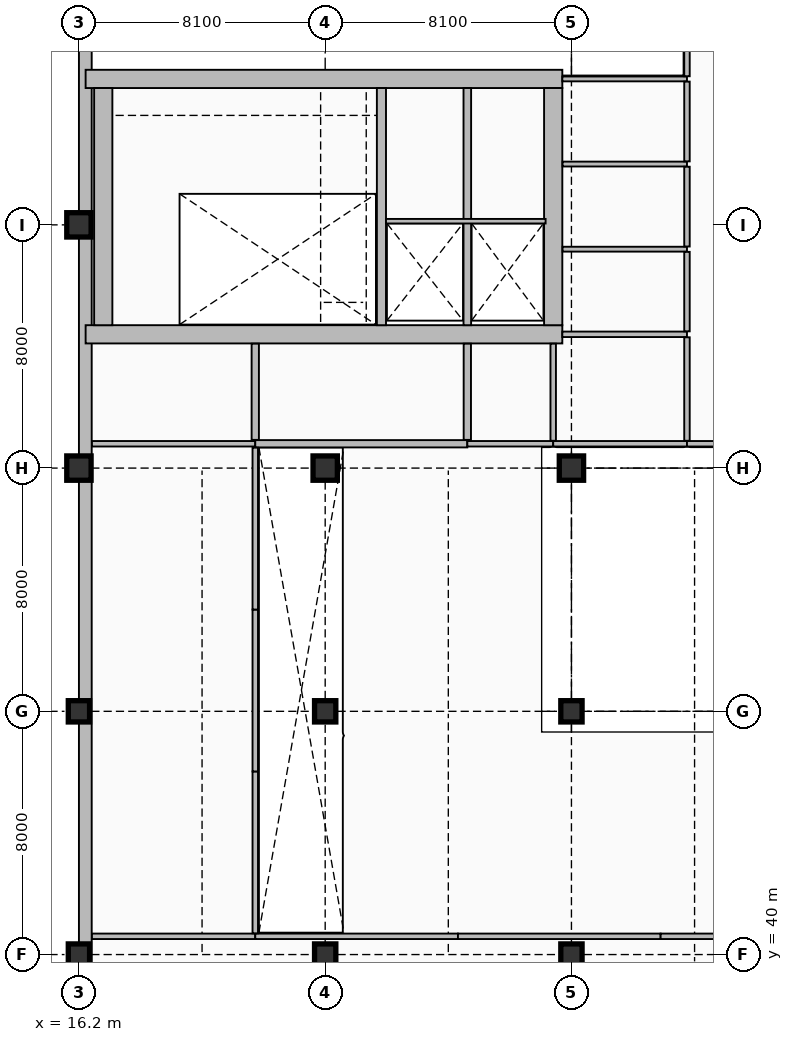
"""IFC4 building model, lengths in metres.
Left out: names, types, materials, properties, quantities, classifications, styles, units other than length and angle.
Written with IfcOpenShell. Run it as: python <this file> out.ifc"""

import sys

from ifc_helpers import new_model, si_unit, direction, frame, frame_2d, origin, origin_2d, place, context, subcontext, project, spatial, rectangle, extrude, element, fill, save


model = new_model("IFC4")
c1 = context("Model", 3, precision=1e-05, world=origin(), true_north=direction((0.0, 1.0)))
c2 = subcontext(c1, "Body", "Model", "MODEL_VIEW")
j1 = project(units=[si_unit("LENGTHUNIT", "METRE"), si_unit("PLANEANGLEUNIT", "RADIAN")], contexts=[c1])
p1 = place(None, origin())
s1 = spatial("IfcSite", under=j1, at=p1, CompositionType="ELEMENT")
p2 = place(p1, origin())
s2 = spatial("IfcBuilding", under=s1, at=p2, CompositionType="ELEMENT")
p3 = place(p2, frame((0.0, 0.0, -4.8)))
s3 = spatial("IfcBuildingStorey", under=s2, at=p3, CompositionType="ELEMENT", Elevation=-4.8)
p4 = place(p3, frame((16.41, 24.21, 0.0), z_axis=(0.0, 0.0, 1.0), x_axis=(0.0, 1.0, 0.0)))
e1 = element("IfcWall", 1, at=p4, inside=s3, PredefinedType="USERDEFINED", context=c2, shape_type="SweptSolid", body=[
    extrude(rectangle(XDim=87.58, YDim=0.42, at=frame_2d((43.79, 0.0))), origin(), (0.0, 0.0, 1.0), 4.45),
])
p5 = place(p3, frame((16.42, 60.4, 0.0), z_axis=(0.0, 0.0, 1.0), x_axis=(1.0, 0.0, 0.0)))
e2 = element("IfcWall", 2, at=p5, inside=s3, PredefinedType="SHEAR", context=c2, shape_type="SweptSolid", body=[
    extrude(rectangle(XDim=15.68, YDim=0.6, at=frame_2d((7.84, 0.0))), origin(), (0.0, 0.0, 1.0), 4.8),
])
p6 = place(p5, frame((1.33, 0.0, 0.0)))
e3 = element("IfcOpeningElement", 3, at=p6, cuts=e2, PredefinedType="OPENING", context=c2, shape_type="SweptSolid", body=[
    extrude(rectangle(XDim=1.15, YDim=2.25, at=frame_2d((0.575, 1.125))), frame((0.0, 0.31, 0.0), z_axis=(0.0, -1.0, 0.0), x_axis=(1.0, 0.0, 0.0)), (0.0, 0.0, 1.0), 0.62),
])
p7 = place(p5, frame((10.613, 0.0, 0.0)))
e4 = element("IfcOpeningElement", 4, at=p7, cuts=e2, PredefinedType="OPENING", context=c2, shape_type="SweptSolid", body=[
    extrude(rectangle(XDim=1.1, YDim=2.2, at=frame_2d((0.55, 1.1))), frame((0.0, 0.31, 0.0), z_axis=(0.0, -1.0, 0.0), x_axis=(1.0, 0.0, 0.0)), (0.0, 0.0, 1.0), 0.62),
])
p8 = place(p5, frame((13.327, 0.0, 0.0)))
e5 = element("IfcOpeningElement", 5, at=p8, cuts=e2, PredefinedType="OPENING", context=c2, shape_type="SweptSolid", body=[
    extrude(rectangle(XDim=1.1, YDim=2.2, at=frame_2d((0.55, 1.1))), frame((0.0, 0.31, 0.0), z_axis=(0.0, -1.0, 0.0), x_axis=(1.0, 0.0, 0.0)), (0.0, 0.0, 1.0), 0.62),
])
p9 = place(p3, frame((16.42, 68.8, 0.0), z_axis=(0.0, 0.0, 1.0), x_axis=(1.0, 0.0, 0.0)))
e6 = element("IfcWall", 6, at=p9, inside=s3, PredefinedType="SHEAR", context=c2, shape_type="SweptSolid", body=[
    extrude(rectangle(XDim=15.68, YDim=0.6, at=frame_2d((7.84, 0.0))), origin(), (0.0, 0.0, 1.0), 4.8),
])
for number, where, z_axis, x_axis in (
    (7, (17.0, 60.7, 0.0), (0.0, 0.0, 1.0), (0.0, 1.0, 0.0)),
    (8, (31.8, 60.7, 0.0), (0.0, 0.0, 1.0), (0.0, 1.0, 0.0)),
):
    element("IfcWall", number, at=place(p3, frame(where, z_axis=z_axis, x_axis=x_axis)), inside=s3, PredefinedType="SHEAR", context=c2, shape_type="SweptSolid", body=[
        extrude(rectangle(XDim=7.8, YDim=0.6, at=frame_2d((3.9, 0.0))), origin(), (0.0, 0.0, 1.0), 4.8),
    ])
p10 = place(p3, frame((26.15, 60.7, 0.0), z_axis=(0.0, 0.0, 1.0), x_axis=(0.0, 1.0, 0.0)))
e9 = element("IfcWall", 9, at=p10, inside=s3, PredefinedType="SHEAR", context=c2, shape_type="SweptSolid", body=[
    extrude(rectangle(XDim=7.8, YDim=0.3, at=frame_2d((3.9, 0.0))), origin(), (0.0, 0.0, 1.0), 4.8),
])
p11 = place(p3, frame((28.975, 60.7, 0.0), z_axis=(0.0, 0.0, 1.0), x_axis=(0.0, 1.0, 0.0)))
e10 = element("IfcWall", 10, at=p11, inside=s3, PredefinedType="SHEAR", context=c2, shape_type="SweptSolid", body=[
    extrude(rectangle(XDim=7.8, YDim=0.25, at=frame_2d((3.9, 0.0))), origin(), (0.0, 0.0, 1.0), 4.8),
])
for number, where, z_axis, x_axis in (
    (11, (16.2, 40.0, 0.0), (0.0, 0.0, 1.0), (1.0, 0.0, 0.0)),
    (12, (16.2, 48.0, 0.0), (0.0, 0.0, 1.0), (1.0, 0.0, 0.0)),
):
    element("IfcColumn", number, at=place(p3, frame(where, z_axis=z_axis, x_axis=x_axis)), inside=s3, PredefinedType="COLUMN", context=c2, shape_type="SweptSolid", body=[
        extrude(rectangle(XDim=0.7, YDim=0.7, at=origin_2d()), origin(), (0.0, 0.0, 1.0), 4.8),
    ])
for number, where, z_axis, x_axis in (
    (13, (16.2, 56.0, 0.0), (0.0, 0.0, 1.0), (1.0, 0.0, 0.0)),
    (14, (16.2, 64.0, 0.0), (0.0, 0.0, 1.0), (1.0, 0.0, 0.0)),
):
    element("IfcColumn", number, at=place(p3, frame(where, z_axis=z_axis, x_axis=x_axis)), inside=s3, PredefinedType="COLUMN", context=c2, shape_type="SweptSolid", body=[
        extrude(rectangle(XDim=0.8, YDim=0.8, at=origin_2d()), origin(), (0.0, 0.0, 1.0), 4.8),
    ])
for number, where, z_axis, x_axis in (
    (15, (24.3, 40.0, 0.0), (0.0, 0.0, 1.0), (1.0, 0.0, 0.0)),
    (16, (24.3, 48.0, 0.0), (0.0, 0.0, 1.0), (1.0, 0.0, 0.0)),
):
    element("IfcColumn", number, at=place(p3, frame(where, z_axis=z_axis, x_axis=x_axis)), inside=s3, PredefinedType="COLUMN", context=c2, shape_type="SweptSolid", body=[
        extrude(rectangle(XDim=0.7, YDim=0.7, at=origin_2d()), origin(), (0.0, 0.0, 1.0), 4.8),
    ])
p12 = place(p3, frame((24.3, 56.0, 0.0), z_axis=(0.0, 0.0, 1.0), x_axis=(1.0, 0.0, 0.0)))
e17 = element("IfcColumn", 17, at=p12, inside=s3, PredefinedType="COLUMN", context=c2, shape_type="SweptSolid", body=[
    extrude(rectangle(XDim=0.8, YDim=0.8, at=origin_2d()), origin(), (0.0, 0.0, 1.0), 4.8),
])
for number, where, z_axis, x_axis in (
    (18, (32.4, 40.0, 0.0), (0.0, 0.0, 1.0), (1.0, 0.0, 0.0)),
    (19, (32.4, 48.0, 0.0), (0.0, 0.0, 1.0), (1.0, 0.0, 0.0)),
):
    element("IfcColumn", number, at=place(p3, frame(where, z_axis=z_axis, x_axis=x_axis)), inside=s3, PredefinedType="COLUMN", context=c2, shape_type="SweptSolid", body=[
        extrude(rectangle(XDim=0.7, YDim=0.7, at=origin_2d()), origin(), (0.0, 0.0, 1.0), 4.8),
    ])
p13 = place(p3, frame((32.4, 56.0, 0.0), z_axis=(0.0, 0.0, 1.0), x_axis=(1.0, 0.0, 0.0)))
e20 = element("IfcColumn", 20, at=p13, inside=s3, PredefinedType="COLUMN", context=c2, shape_type="SweptSolid", body=[
    extrude(rectangle(XDim=0.8, YDim=0.8, at=origin_2d()), origin(), (0.0, 0.0, 1.0), 4.8),
])
p14 = place(p3, frame((26.3, 64.12, 0.0), z_axis=(0.0, 0.0, 1.0), x_axis=(1.0, 0.0, 0.0)))
e21 = element("IfcWall", 21, at=p14, inside=s3, PredefinedType="PARTITIONING", context=c2, shape_type="SweptSolid", body=[
    extrude(rectangle(XDim=5.25, YDim=0.15, at=frame_2d((2.625, 0.0))), origin(), (0.0, 0.0, 1.0), 4.45),
])
p15 = place(p3, frame((16.628, 40.6, 0.0), z_axis=(0.0, 0.0, 1.0), x_axis=(1.0, 0.0, 0.0)))
e22 = element("IfcWall", 22, at=p15, inside=s3, PredefinedType="PARTITIONING", context=c2, shape_type="SweptSolid", body=[
    extrude(rectangle(XDim=5.372, YDim=0.18, at=frame_2d((2.686, 0.0))), origin(), (0.0, 0.0, 1.0), 4.45),
])
p16 = place(p15, frame((2.136, 0.0, 0.0)))
e23 = element("IfcOpeningElement", 23, at=p16, cuts=e22, PredefinedType="OPENING", context=c2, shape_type="SweptSolid", body=[
    extrude(rectangle(XDim=1.1, YDim=2.2, at=frame_2d((0.55, 1.1))), frame((0.0, 0.1, 0.0), z_axis=(0.0, -1.0, 0.0), x_axis=(1.0, 0.0, 0.0)), (0.0, 0.0, 1.0), 0.2),
])
p17 = place(p3, frame((16.628, 56.8, 0.0), z_axis=(0.0, 0.0, 1.0), x_axis=(1.0, 0.0, 0.0)))
e24 = element("IfcWall", 24, at=p17, inside=s3, PredefinedType="PARTITIONING", context=c2, shape_type="SweptSolid", body=[
    extrude(rectangle(XDim=5.372, YDim=0.18, at=frame_2d((2.686, 0.0))), origin(), (0.0, 0.0, 1.0), 4.45),
])
p18 = place(p17, frame((2.136, 0.0, 0.0)))
e25 = element("IfcOpeningElement", 25, at=p18, cuts=e24, PredefinedType="OPENING", context=c2, shape_type="SweptSolid", body=[
    extrude(rectangle(XDim=1.1, YDim=2.2, at=frame_2d((0.55, 1.1))), frame((0.0, 0.1, 0.0), z_axis=(0.0, -1.0, 0.0), x_axis=(1.0, 0.0, 0.0)), (0.0, 0.0, 1.0), 0.2),
])
p19 = place(p3, frame((22.0, 40.6, 0.0), z_axis=(0.0, 0.0, 1.0), x_axis=(1.0, 0.0, 0.0)))
e26 = element("IfcWall", 26, at=p19, inside=s3, PredefinedType="PARTITIONING", context=c2, shape_type="SweptSolid", body=[
    extrude(rectangle(XDim=6.667, YDim=0.18, at=frame_2d((3.333, 0.0))), origin(), (0.0, 0.0, 1.0), 4.45),
])
p20 = place(p3, frame((28.667, 40.6, 0.0), z_axis=(0.0, 0.0, 1.0), x_axis=(1.0, 0.0, 0.0)))
e27 = element("IfcWall", 27, at=p20, inside=s3, PredefinedType="PARTITIONING", context=c2, shape_type="SweptSolid", body=[
    extrude(rectangle(XDim=6.667, YDim=0.18, at=frame_2d((3.333, 0.0))), origin(), (0.0, 0.0, 1.0), 4.45),
])
p21 = place(p3, frame((35.333, 40.6, 0.0), z_axis=(0.0, 0.0, 1.0), x_axis=(1.0, 0.0, 0.0)))
e28 = element("IfcWall", 28, at=p21, inside=s3, PredefinedType="PARTITIONING", context=c2, shape_type="SweptSolid", body=[
    extrude(rectangle(XDim=6.667, YDim=0.18, at=frame_2d((3.333, 0.0))), origin(), (0.0, 0.0, 1.0), 4.45),
])
p22 = place(p3, frame((22.0, 56.8, 0.0), z_axis=(0.0, 0.0, 1.0), x_axis=(1.0, 0.0, 0.0)))
e29 = element("IfcWall", 29, at=p22, inside=s3, PredefinedType="PARTITIONING", context=c2, shape_type="SweptSolid", body=[
    extrude(rectangle(XDim=6.975, YDim=0.24, at=frame_2d((3.488, 0.0))), origin(), (0.0, 0.0, 1.0), 4.45),
])
p23 = place(p22, frame((4.003, 0.0, 0.0)))
e30 = element("IfcOpeningElement", 30, at=p23, cuts=e29, PredefinedType="OPENING", context=c2, shape_type="SweptSolid", body=[
    extrude(rectangle(XDim=1.2, YDim=2.3, at=frame_2d((0.6, 1.15))), frame((0.0, 0.13, 0.0), z_axis=(0.0, -1.0, 0.0), x_axis=(1.0, 0.0, 0.0)), (0.0, 0.0, 1.0), 0.26),
])
p24 = place(p3, frame((28.975, 56.8, 0.0), z_axis=(0.0, 0.0, 1.0), x_axis=(1.0, 0.0, 0.0)))
e31 = element("IfcWall", 31, at=p24, inside=s3, PredefinedType="PARTITIONING", context=c2, shape_type="SweptSolid", body=[
    extrude(rectangle(XDim=2.825, YDim=0.18, at=frame_2d((1.413, 0.0))), origin(), (0.0, 0.0, 1.0), 4.45),
])
p25 = place(p24, frame((0.636, 0.0, 0.0)))
e32 = element("IfcOpeningElement", 32, at=p25, cuts=e31, PredefinedType="OPENING", context=c2, shape_type="SweptSolid", body=[
    extrude(rectangle(XDim=1.1, YDim=2.2, at=frame_2d((0.55, 1.1))), frame((0.0, 0.1, 0.0), z_axis=(0.0, -1.0, 0.0), x_axis=(1.0, 0.0, 0.0)), (0.0, 0.0, 1.0), 0.2),
])
p26 = place(p3, frame((31.8, 56.8, 0.0), z_axis=(0.0, 0.0, 1.0), x_axis=(1.0, 0.0, 0.0)))
e33 = element("IfcWall", 33, at=p26, inside=s3, PredefinedType="PARTITIONING", context=c2, shape_type="SweptSolid", body=[
    extrude(rectangle(XDim=4.4, YDim=0.18, at=frame_2d((2.2, 0.0))), origin(), (0.0, 0.0, 1.0), 4.45),
])
p27 = place(p3, frame((32.1, 60.4, 0.0), z_axis=(0.0, 0.0, 1.0), x_axis=(1.0, 0.0, 0.0)))
e34 = element("IfcWall", 34, at=p27, inside=s3, PredefinedType="PARTITIONING", context=c2, shape_type="SweptSolid", body=[
    extrude(rectangle(XDim=4.1, YDim=0.18, at=frame_2d((2.05, 0.0))), origin(), (0.0, 0.0, 1.0), 4.45),
])
for number, where, z_axis, x_axis in (
    (35, (32.108, 63.2, 0.0), (0.0, 0.0, 1.0), (1.0, 0.0, 0.0)),
    (36, (32.108, 66.0, 0.0), (0.0, 0.0, 1.0), (1.0, 0.0, 0.0)),
):
    element("IfcWall", number, at=place(p3, frame(where, z_axis=z_axis, x_axis=x_axis)), inside=s3, PredefinedType="PARTITIONING", context=c2, shape_type="SweptSolid", body=[
        extrude(rectangle(XDim=4.092, YDim=0.16, at=frame_2d((2.046, 0.0))), origin(), (0.0, 0.0, 1.0), 4.45),
    ])
p28 = place(p3, frame((32.1, 68.8, 0.0), z_axis=(0.0, 0.0, 1.0), x_axis=(1.0, 0.0, 0.0)))
e37 = element("IfcWall", 37, at=p28, inside=s3, PredefinedType="PARTITIONING", context=c2, shape_type="SweptSolid", body=[
    extrude(rectangle(XDim=4.1, YDim=0.16, at=frame_2d((2.05, 0.0))), origin(), (0.0, 0.0, 1.0), 4.45),
])
p29 = place(p3, frame((36.2, 56.8, 0.0), z_axis=(0.0, 0.0, 1.0), x_axis=(1.0, 0.0, 0.0)))
e38 = element("IfcWall", 38, at=p29, inside=s3, PredefinedType="PARTITIONING", context=c2, shape_type="SweptSolid", body=[
    extrude(rectangle(XDim=4.3, YDim=0.18, at=frame_2d((2.15, 0.0))), origin(), (0.0, 0.0, 1.0), 4.45),
])
for number, where, z_axis, x_axis in (
    (39, (22.0, 40.698, 0.0), (0.0, 0.0, 1.0), (0.0, 1.0, 0.0)),
    (40, (22.0, 46.023, 0.0), (0.0, 0.0, 1.0), (0.0, 1.0, 0.0)),
    (41, (22.0, 51.347, 0.0), (0.0, 0.0, 1.0), (0.0, 1.0, 0.0)),
):
    element("IfcWall", number, at=place(p3, frame(where, z_axis=z_axis, x_axis=x_axis)), inside=s3, PredefinedType="PARTITIONING", context=c2, shape_type="SweptSolid", body=[
        extrude(rectangle(XDim=5.325, YDim=0.18, at=frame_2d((2.662, 0.0))), origin(), (0.0, 0.0, 1.0), 4.45),
    ])
p30 = place(p3, frame((22.0, 56.928, 0.0), z_axis=(0.0, 0.0, 1.0), x_axis=(0.0, 1.0, 0.0)))
e42 = element("IfcWall", 42, at=p30, inside=s3, PredefinedType="PARTITIONING", context=c2, shape_type="SweptSolid", body=[
    extrude(rectangle(XDim=3.164, YDim=0.24, at=frame_2d((1.582, 0.0))), origin(), (0.0, 0.0, 1.0), 4.45),
])
p31 = place(p30, frame((1.082, 0.0, 0.0)))
e43 = element("IfcOpeningElement", 43, at=p31, cuts=e42, PredefinedType="OPENING", context=c2, shape_type="SweptSolid", body=[
    extrude(rectangle(XDim=1.0, YDim=2.2, at=frame_2d((0.5, 1.1))), frame((0.0, 0.13, 0.0), z_axis=(0.0, -1.0, 0.0), x_axis=(1.0, 0.0, 0.0)), (0.0, 0.0, 1.0), 0.26),
])
p32 = place(p3, frame((28.975, 56.928, 0.0), z_axis=(0.0, 0.0, 1.0), x_axis=(0.0, 1.0, 0.0)))
e44 = element("IfcWall", 44, at=p32, inside=s3, PredefinedType="PARTITIONING", context=c2, shape_type="SweptSolid", body=[
    extrude(rectangle(XDim=3.164, YDim=0.24, at=frame_2d((1.582, 0.0))), origin(), (0.0, 0.0, 1.0), 4.45),
])
p33 = place(p3, frame((31.8, 56.898, 0.0), z_axis=(0.0, 0.0, 1.0), x_axis=(0.0, 1.0, 0.0)))
e45 = element("IfcWall", 45, at=p33, inside=s3, PredefinedType="PARTITIONING", context=c2, shape_type="SweptSolid", body=[
    extrude(rectangle(XDim=3.194, YDim=0.18, at=frame_2d((1.597, 0.0))), origin(), (0.0, 0.0, 1.0), 4.45),
])
p34 = place(p3, frame((36.2, 56.898, 0.0), z_axis=(0.0, 0.0, 1.0), x_axis=(0.0, 1.0, 0.0)))
e46 = element("IfcWall", 46, at=p34, inside=s3, PredefinedType="PARTITIONING", context=c2, shape_type="SweptSolid", body=[
    extrude(rectangle(XDim=3.404, YDim=0.18, at=frame_2d((1.702, 0.0))), origin(), (0.0, 0.0, 1.0), 4.45),
])
p35 = place(p34, frame((1.202, 0.0, 0.0)))
e47 = element("IfcOpeningElement", 47, at=p35, cuts=e46, PredefinedType="OPENING", context=c2, shape_type="SweptSolid", body=[
    extrude(rectangle(XDim=1.0, YDim=2.15, at=frame_2d((0.5, 1.075))), frame((0.0, 0.1, 0.0), z_axis=(0.0, -1.0, 0.0), x_axis=(1.0, 0.0, 0.0)), (0.0, 0.0, 1.0), 0.2),
])
p36 = place(p3, frame((36.2, 60.498, 0.0), z_axis=(0.0, 0.0, 1.0), x_axis=(0.0, 1.0, 0.0)))
e48 = element("IfcWall", 48, at=p36, inside=s3, PredefinedType="PARTITIONING", context=c2, shape_type="SweptSolid", body=[
    extrude(rectangle(XDim=2.614, YDim=0.18, at=frame_2d((1.307, 0.0))), origin(), (0.0, 0.0, 1.0), 4.45),
])
p37 = place(p36, frame((0.832, 0.0, 0.0)))
e49 = element("IfcOpeningElement", 49, at=p37, cuts=e48, PredefinedType="OPENING", context=c2, shape_type="SweptSolid", body=[
    extrude(rectangle(XDim=0.95, YDim=2.1, at=frame_2d((0.475, 1.05))), frame((0.0, 0.1, 0.0), z_axis=(0.0, -1.0, 0.0), x_axis=(1.0, 0.0, 0.0)), (0.0, 0.0, 1.0), 0.2),
])
p38 = place(p3, frame((36.2, 63.288, 0.0), z_axis=(0.0, 0.0, 1.0), x_axis=(0.0, 1.0, 0.0)))
e50 = element("IfcWall", 50, at=p38, inside=s3, PredefinedType="PARTITIONING", context=c2, shape_type="SweptSolid", body=[
    extrude(rectangle(XDim=2.624, YDim=0.18, at=frame_2d((1.312, 0.0))), origin(), (0.0, 0.0, 1.0), 4.45),
])
p39 = place(p38, frame((0.837, 0.0, 0.0)))
e51 = element("IfcOpeningElement", 51, at=p39, cuts=e50, PredefinedType="OPENING", context=c2, shape_type="SweptSolid", body=[
    extrude(rectangle(XDim=0.95, YDim=2.1, at=frame_2d((0.475, 1.05))), frame((0.0, 0.1, 0.0), z_axis=(0.0, -1.0, 0.0), x_axis=(1.0, 0.0, 0.0)), (0.0, 0.0, 1.0), 0.2),
])
p40 = place(p3, frame((36.2, 66.088, 0.0), z_axis=(0.0, 0.0, 1.0), x_axis=(0.0, 1.0, 0.0)))
e52 = element("IfcWall", 52, at=p40, inside=s3, PredefinedType="PARTITIONING", context=c2, shape_type="SweptSolid", body=[
    extrude(rectangle(XDim=2.624, YDim=0.18, at=frame_2d((1.312, 0.0))), origin(), (0.0, 0.0, 1.0), 4.45),
])
p41 = place(p40, frame((0.812, 0.0, 0.0)))
e53 = element("IfcOpeningElement", 53, at=p41, cuts=e52, PredefinedType="OPENING", context=c2, shape_type="SweptSolid", body=[
    extrude(rectangle(XDim=1.0, YDim=2.15, at=frame_2d((0.5, 1.075))), frame((0.0, 0.1, 0.0), z_axis=(0.0, -1.0, 0.0), x_axis=(1.0, 0.0, 0.0)), (0.0, 0.0, 1.0), 0.2),
])
p42 = place(p3, frame((36.2, 68.888, 0.0), z_axis=(0.0, 0.0, 1.0), x_axis=(0.0, 1.0, 0.0)))
e54 = element("IfcWall", 54, at=p42, inside=s3, PredefinedType="PARTITIONING", context=c2, shape_type="SweptSolid", body=[
    extrude(rectangle(XDim=6.007, YDim=0.18, at=frame_2d((3.003, 0.0))), origin(), (0.0, 0.0, 1.0), 4.035),
])
p43 = place(p6, frame((1.15, 0.0, 0.0), z_axis=(0.0, 0.0, 1.0), x_axis=(-1.0, 0.0, 0.0)))
e55 = element("IfcDoor", 55, at=p43, inside=s3, OperationType="SINGLE_SWING_LEFT", PredefinedType="DOOR", context=c2, shape_type="SweptSolid", body=[
    extrude(rectangle(XDim=1.15, YDim=2.25, at=frame_2d((0.575, 1.125))), frame((0.0, 0.025, 0.0), z_axis=(0.0, -1.0, 0.0), x_axis=(1.0, 0.0, 0.0)), (0.0, 0.0, 1.0), 0.05),
])
fill(e3, e55)
p44 = place(p7, frame((1.1, 0.0, 0.0), z_axis=(0.0, 0.0, 1.0), x_axis=(-1.0, 0.0, 0.0)))
e56 = element("IfcDoor", 56, at=p44, inside=s3, OperationType="DOUBLE_DOOR_SLIDING", PredefinedType="DOOR", context=c2, shape_type="SweptSolid", body=[
    extrude(rectangle(XDim=1.1, YDim=2.2, at=frame_2d((0.55, 1.1))), frame((0.0, 0.025, 0.0), z_axis=(0.0, -1.0, 0.0), x_axis=(1.0, 0.0, 0.0)), (0.0, 0.0, 1.0), 0.05),
])
fill(e4, e56)
p45 = place(p8, frame((1.1, 0.0, 0.0), z_axis=(0.0, 0.0, 1.0), x_axis=(-1.0, 0.0, 0.0)))
e57 = element("IfcDoor", 57, at=p45, inside=s3, OperationType="DOUBLE_DOOR_SLIDING", PredefinedType="DOOR", context=c2, shape_type="SweptSolid", body=[
    extrude(rectangle(XDim=1.1, YDim=2.2, at=frame_2d((0.55, 1.1))), frame((0.0, 0.025, 0.0), z_axis=(0.0, -1.0, 0.0), x_axis=(1.0, 0.0, 0.0)), (0.0, 0.0, 1.0), 0.05),
])
fill(e5, e57)
p46 = place(p16, origin())
e58 = element("IfcDoor", 58, at=p46, inside=s3, OperationType="SINGLE_SWING_RIGHT", PredefinedType="DOOR", context=c2, shape_type="SweptSolid", body=[
    extrude(rectangle(XDim=1.1, YDim=2.2, at=frame_2d((0.55, 1.1))), frame((0.0, 0.025, 0.0), z_axis=(0.0, -1.0, 0.0), x_axis=(1.0, 0.0, 0.0)), (0.0, 0.0, 1.0), 0.05),
])
fill(e23, e58)
p47 = place(p18, frame((1.1, 0.0, 0.0), z_axis=(0.0, 0.0, 1.0), x_axis=(-1.0, 0.0, 0.0)))
e59 = element("IfcDoor", 59, at=p47, inside=s3, OperationType="SINGLE_SWING_LEFT", PredefinedType="DOOR", context=c2, shape_type="SweptSolid", body=[
    extrude(rectangle(XDim=1.1, YDim=2.2, at=frame_2d((0.55, 1.1))), frame((0.0, 0.025, 0.0), z_axis=(0.0, -1.0, 0.0), x_axis=(1.0, 0.0, 0.0)), (0.0, 0.0, 1.0), 0.05),
])
fill(e25, e59)
p48 = place(p23, frame((1.2, 0.0, 0.0), z_axis=(0.0, 0.0, 1.0), x_axis=(-1.0, 0.0, 0.0)))
e60 = element("IfcDoor", 60, at=p48, inside=s3, OperationType="SINGLE_SWING_LEFT", PredefinedType="DOOR", context=c2, shape_type="SweptSolid", body=[
    extrude(rectangle(XDim=1.2, YDim=2.3, at=frame_2d((0.6, 1.15))), frame((0.0, 0.025, 0.0), z_axis=(0.0, -1.0, 0.0), x_axis=(1.0, 0.0, 0.0)), (0.0, 0.0, 1.0), 0.05),
])
fill(e30, e60)
p49 = place(p25, frame((1.1, 0.0, 0.0), z_axis=(0.0, 0.0, 1.0), x_axis=(-1.0, 0.0, 0.0)))
e61 = element("IfcDoor", 61, at=p49, inside=s3, OperationType="SINGLE_SWING_RIGHT", PredefinedType="DOOR", context=c2, shape_type="SweptSolid", body=[
    extrude(rectangle(XDim=1.1, YDim=2.2, at=frame_2d((0.55, 1.1))), frame((0.0, 0.025, 0.0), z_axis=(0.0, -1.0, 0.0), x_axis=(1.0, 0.0, 0.0)), (0.0, 0.0, 1.0), 0.05),
])
fill(e32, e61)
p50 = place(p31, origin())
e62 = element("IfcDoor", 62, at=p50, inside=s3, OperationType="SINGLE_SWING_RIGHT", PredefinedType="DOOR", context=c2, shape_type="SweptSolid", body=[
    extrude(rectangle(XDim=1.0, YDim=2.2, at=frame_2d((0.5, 1.1))), frame((0.0, 0.025, 0.0), z_axis=(0.0, -1.0, 0.0), x_axis=(1.0, 0.0, 0.0)), (0.0, 0.0, 1.0), 0.05),
])
fill(e43, e62)
p51 = place(p35, origin())
e63 = element("IfcDoor", 63, at=p51, inside=s3, OperationType="SINGLE_SWING_RIGHT", PredefinedType="DOOR", context=c2, shape_type="SweptSolid", body=[
    extrude(rectangle(XDim=1.0, YDim=2.15, at=frame_2d((0.5, 1.075))), frame((0.0, 0.025, 0.0), z_axis=(0.0, -1.0, 0.0), x_axis=(1.0, 0.0, 0.0)), (0.0, 0.0, 1.0), 0.05),
])
fill(e47, e63)
p52 = place(p37, origin())
e64 = element("IfcDoor", 64, at=p52, inside=s3, OperationType="SINGLE_SWING_LEFT", PredefinedType="DOOR", context=c2, shape_type="SweptSolid", body=[
    extrude(rectangle(XDim=0.95, YDim=2.1, at=frame_2d((0.475, 1.05))), frame((0.0, 0.025, 0.0), z_axis=(0.0, -1.0, 0.0), x_axis=(1.0, 0.0, 0.0)), (0.0, 0.0, 1.0), 0.05),
])
fill(e49, e64)
p53 = place(p39, origin())
e65 = element("IfcDoor", 65, at=p53, inside=s3, OperationType="SINGLE_SWING_RIGHT", PredefinedType="DOOR", context=c2, shape_type="SweptSolid", body=[
    extrude(rectangle(XDim=0.95, YDim=2.1, at=frame_2d((0.475, 1.05))), frame((0.0, 0.025, 0.0), z_axis=(0.0, -1.0, 0.0), x_axis=(1.0, 0.0, 0.0)), (0.0, 0.0, 1.0), 0.05),
])
fill(e51, e65)
p54 = place(p41, origin())
e66 = element("IfcDoor", 66, at=p54, inside=s3, OperationType="SINGLE_SWING_LEFT", PredefinedType="DOOR", context=c2, shape_type="SweptSolid", body=[
    extrude(rectangle(XDim=1.0, YDim=2.15, at=frame_2d((0.5, 1.075))), frame((0.0, 0.025, 0.0), z_axis=(0.0, -1.0, 0.0), x_axis=(1.0, 0.0, 0.0)), (0.0, 0.0, 1.0), 0.05),
])
fill(e53, e66)
save(model, sys.argv[1])
